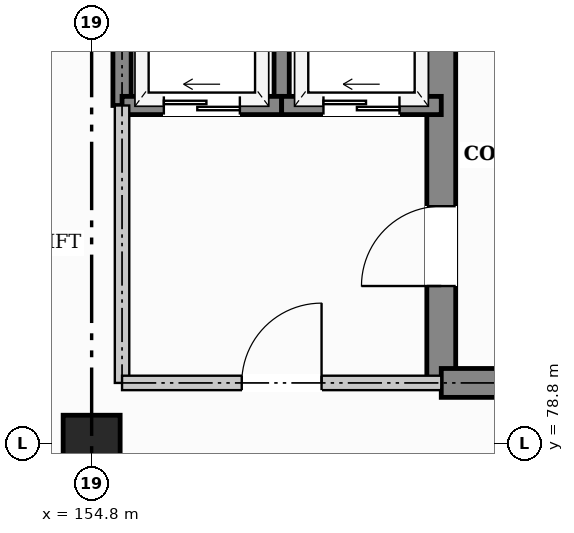
"""IFC4 building model, lengths in metres.
Left out: names, types, materials, properties, quantities, classifications, styles, units other than length and angle.
Written with IfcOpenShell. Run it as: python <this file> out.ifc"""

import sys

from ifc_helpers import new_model, si_unit, direction, frame, frame_2d, origin, origin_2d, place, context, subcontext, project, spatial, rectangle, extrude, element, fill, save


model = new_model("IFC4")
c1 = context("Model", 3, precision=1e-05, world=origin(), true_north=direction((0.0, 1.0)))
c2 = subcontext(c1, "Body", "Model", "MODEL_VIEW")
j1 = project(units=[si_unit("LENGTHUNIT", "METRE"), si_unit("PLANEANGLEUNIT", "RADIAN")], contexts=[c1])
p1 = place(None, origin())
s1 = spatial("IfcSite", under=j1, at=p1, CompositionType="ELEMENT")
p2 = place(p1, origin())
s2 = spatial("IfcBuilding", under=s1, at=p2, CompositionType="ELEMENT")
p3 = place(p2, frame((0.0, 0.0, 13.2)))
s3 = spatial("IfcBuildingStorey", under=s2, at=p3, CompositionType="ELEMENT", Elevation=13.2)
p4 = place(p3, frame((154.8, 78.8, 0.0), z_axis=(0.0, 0.0, 1.0), x_axis=(1.0, 0.0, 0.0)))
e1 = element("IfcColumn", 1, at=p4, inside=s3, PredefinedType="COLUMN", context=c2, shape_type="SweptSolid", body=[
    extrude(rectangle(XDim=0.75, YDim=0.75, at=origin_2d()), origin(), (0.0, 0.0, 1.0), 3.6),
])
p5 = place(p3, frame((159.4, 79.6, 0.0), z_axis=(0.0, 0.0, 1.0), x_axis=(0.0, 1.0, 0.0)))
e2 = element("IfcWall", 2, at=p5, inside=s3, PredefinedType="SHEAR", context=c2, shape_type="SweptSolid", body=[
    extrude(rectangle(XDim=6.0, YDim=0.38, at=frame_2d((3.0, 0.0))), origin(), (0.0, 0.0, 1.0), 3.32),
])
p6 = place(p5, frame((1.275, 0.0, 0.0)))
e3 = element("IfcOpeningElement", 3, at=p6, cuts=e2, PredefinedType="OPENING", context=c2, shape_type="SweptSolid", body=[
    extrude(rectangle(XDim=1.05, YDim=2.15, at=frame_2d((0.525, 1.075))), frame((0.0, 0.2, 0.0), z_axis=(0.0, -1.0, 0.0), x_axis=(1.0, 0.0, 0.0)), (0.0, 0.0, 1.0), 0.4),
])
p7 = place(p3, frame((159.4, 79.6, 0.0), z_axis=(0.0, 0.0, 1.0), x_axis=(1.0, 0.0, 0.0)))
e4 = element("IfcWall", 4, at=p7, inside=s3, PredefinedType="SHEAR", context=c2, shape_type="SweptSolid", body=[
    extrude(rectangle(XDim=7.0, YDim=0.38, at=frame_2d((3.5, 0.0))), origin(), (0.0, 0.0, 1.0), 3.32),
])
p8 = place(p3, frame((155.2, 83.25, 0.0), z_axis=(0.0, 0.0, 1.0), x_axis=(0.0, 1.0, 0.0)))
e5 = element("IfcWall", 5, at=p8, inside=s3, PredefinedType="SHEAR", context=c2, shape_type="SweptSolid", body=[
    extrude(rectangle(XDim=2.35, YDim=0.24, at=frame_2d((1.175, 0.0))), origin(), (0.0, 0.0, 1.0), 3.32),
])
p9 = place(p3, frame((157.3, 83.25, 0.0), z_axis=(0.0, 0.0, 1.0), x_axis=(0.0, 1.0, 0.0)))
e6 = element("IfcWall", 6, at=p9, inside=s3, PredefinedType="SHEAR", context=c2, shape_type="SweptSolid", body=[
    extrude(rectangle(XDim=2.35, YDim=0.2, at=frame_2d((1.175, 0.0))), origin(), (0.0, 0.0, 1.0), 3.32),
])
p10 = place(p3, frame((155.2, 83.25, 0.0), z_axis=(0.0, 0.0, 1.0), x_axis=(1.0, 0.0, 0.0)))
e7 = element("IfcWall", 7, at=p10, inside=s3, PredefinedType="SHEAR", context=c2, shape_type="SweptSolid", body=[
    extrude(rectangle(XDim=2.1, YDim=0.24, at=frame_2d((1.05, 0.0))), origin(), (0.0, 0.0, 1.0), 3.32),
])
p11 = place(p10, frame((0.55, 0.0, 0.0)))
e8 = element("IfcOpeningElement", 8, at=p11, cuts=e7, PredefinedType="OPENING", context=c2, shape_type="SweptSolid", body=[
    extrude(rectangle(XDim=1.0, YDim=2.1, at=frame_2d((0.5, 1.05))), frame((0.0, 0.13, 0.0), z_axis=(0.0, -1.0, 0.0), x_axis=(1.0, 0.0, 0.0)), (0.0, 0.0, 1.0), 0.26),
])
p12 = place(p3, frame((157.3, 83.25, 0.0), z_axis=(0.0, 0.0, 1.0), x_axis=(1.0, 0.0, 0.0)))
e9 = element("IfcWall", 9, at=p12, inside=s3, PredefinedType="SHEAR", context=c2, shape_type="SweptSolid", body=[
    extrude(rectangle(XDim=2.1, YDim=0.24, at=frame_2d((1.05, 0.0))), origin(), (0.0, 0.0, 1.0), 3.32),
])
p13 = place(p12, frame((0.55, 0.0, 0.0)))
e10 = element("IfcOpeningElement", 10, at=p13, cuts=e9, PredefinedType="OPENING", context=c2, shape_type="SweptSolid", body=[
    extrude(rectangle(XDim=1.0, YDim=2.1, at=frame_2d((0.5, 1.05))), frame((0.0, 0.13, 0.0), z_axis=(0.0, -1.0, 0.0), x_axis=(1.0, 0.0, 0.0)), (0.0, 0.0, 1.0), 0.26),
])
p14 = place(p3, frame((155.2, 79.6, 0.0), z_axis=(0.0, 0.0, 1.0), x_axis=(0.0, 1.0, 0.0)))
e11 = element("IfcWall", 11, at=p14, inside=s3, PredefinedType="PARTITIONING", context=c2, shape_type="SweptSolid", body=[
    extrude(rectangle(XDim=3.65, YDim=0.19, at=frame_2d((1.825, 0.0))), origin(), (0.0, 0.0, 1.0), 3.32),
])
p15 = place(p3, frame((155.2, 79.6, 0.0), z_axis=(0.0, 0.0, 1.0), x_axis=(1.0, 0.0, 0.0)))
e12 = element("IfcWall", 12, at=p15, inside=s3, PredefinedType="PARTITIONING", context=c2, shape_type="SweptSolid", body=[
    extrude(rectangle(XDim=4.2, YDim=0.19, at=frame_2d((2.1, 0.0))), origin(), (0.0, 0.0, 1.0), 3.32),
])
p16 = place(p15, frame((1.575, 0.0, 0.0)))
e13 = element("IfcOpeningElement", 13, at=p16, cuts=e12, PredefinedType="OPENING", context=c2, shape_type="SweptSolid", body=[
    extrude(rectangle(XDim=1.05, YDim=2.15, at=frame_2d((0.525, 1.075))), frame((0.0, 0.105, 0.0), z_axis=(0.0, -1.0, 0.0), x_axis=(1.0, 0.0, 0.0)), (0.0, 0.0, 1.0), 0.21),
])
p17 = place(p6, origin())
e14 = element("IfcDoor", 14, at=p17, inside=s3, OperationType="SINGLE_SWING_LEFT", PredefinedType="DOOR", context=c2, shape_type="SweptSolid", body=[
    extrude(rectangle(XDim=1.05, YDim=2.15, at=frame_2d((0.525, 1.075))), frame((0.0, 0.025, 0.0), z_axis=(0.0, -1.0, 0.0), x_axis=(1.0, 0.0, 0.0)), (0.0, 0.0, 1.0), 0.05),
])
fill(e3, e14)
p18 = place(p11, origin())
e15 = element("IfcDoor", 15, at=p18, inside=s3, OperationType="SLIDING_TO_LEFT", PredefinedType="DOOR", context=c2, shape_type="SweptSolid", body=[
    extrude(rectangle(XDim=1.0, YDim=2.1, at=frame_2d((0.5, 1.05))), frame((0.0, 0.025, 0.0), z_axis=(0.0, -1.0, 0.0), x_axis=(1.0, 0.0, 0.0)), (0.0, 0.0, 1.0), 0.05),
])
fill(e8, e15)
p19 = place(p13, origin())
e16 = element("IfcDoor", 16, at=p19, inside=s3, OperationType="SLIDING_TO_LEFT", PredefinedType="DOOR", context=c2, shape_type="SweptSolid", body=[
    extrude(rectangle(XDim=1.0, YDim=2.1, at=frame_2d((0.5, 1.05))), frame((0.0, 0.025, 0.0), z_axis=(0.0, -1.0, 0.0), x_axis=(1.0, 0.0, 0.0)), (0.0, 0.0, 1.0), 0.05),
])
fill(e10, e16)
p20 = place(p16, origin())
e17 = element("IfcDoor", 17, at=p20, inside=s3, OperationType="SINGLE_SWING_RIGHT", PredefinedType="DOOR", context=c2, shape_type="SweptSolid", body=[
    extrude(rectangle(XDim=1.05, YDim=2.15, at=frame_2d((0.525, 1.075))), frame((0.0, 0.025, 0.0), z_axis=(0.0, -1.0, 0.0), x_axis=(1.0, 0.0, 0.0)), (0.0, 0.0, 1.0), 0.05),
])
fill(e13, e17)
save(model, sys.argv[1])
